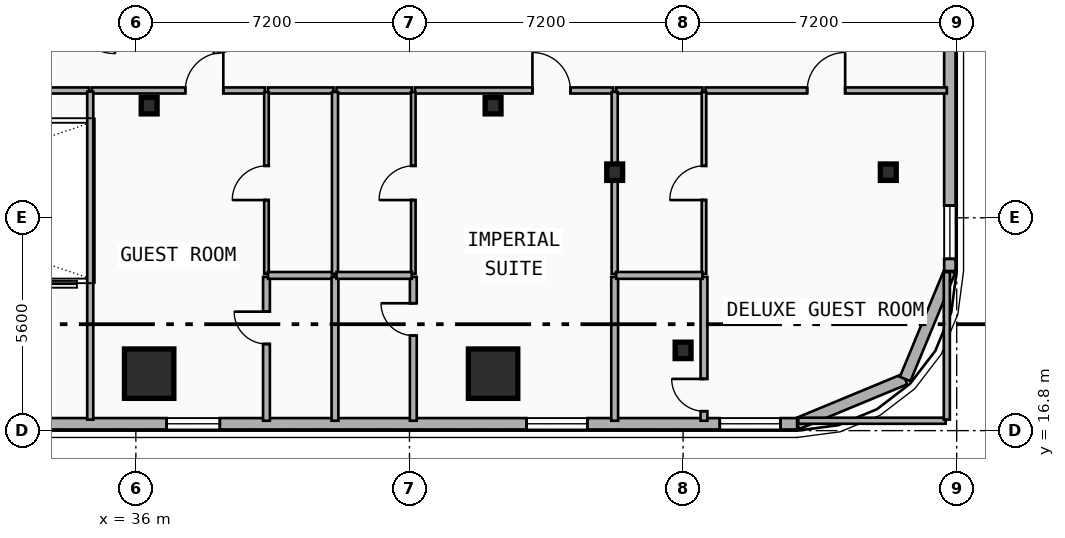
"""IFC4 building model, lengths in metres.
Left out: names, types, materials, properties, quantities, classifications, styles, units other than length and angle.
Written with IfcOpenShell. Run it as: python <this file> out.ifc"""

import sys

from ifc_helpers import new_model, si_unit, direction, frame, frame_2d, origin, origin_2d, place, context, subcontext, project, spatial, rectangle, i_section, extrude, element, fill, save


model = new_model("IFC4")
c1 = context("Model", 3, precision=1e-05, world=origin(), true_north=direction((0.0, 1.0)))
c2 = subcontext(c1, "Body", "Model", "MODEL_VIEW")
j1 = project(units=[si_unit("LENGTHUNIT", "METRE"), si_unit("PLANEANGLEUNIT", "RADIAN")], contexts=[c1])
p1 = place(None, origin())
s1 = spatial("IfcSite", under=j1, at=p1, CompositionType="ELEMENT")
p2 = place(p1, origin())
s2 = spatial("IfcBuilding", under=s1, at=p2, CompositionType="ELEMENT")
p3 = place(p2, frame((0.0, 0.0, 86.3)))
s3 = spatial("IfcBuildingStorey", under=s2, at=p3, CompositionType="ELEMENT", Elevation=86.3)
for number, where, z_axis, x_axis in (
    (1, (36.35, 25.35, 0.0), (0.0, 0.0, 1.0), (1.0, 0.0, 0.0)),
    (2, (45.4, 25.35, 0.0), (0.0, 0.0, 1.0), (1.0, 0.0, 0.0)),
):
    element("IfcColumn", number, at=place(p3, frame(where, z_axis=z_axis, x_axis=x_axis)), inside=s3, PredefinedType="COLUMN", context=c2, shape_type="SweptSolid", body=[
        extrude(i_section(OverallWidth=0.418, OverallDepth=0.432, WebThickness=0.035, FlangeThickness=0.056, FilletRadius=0.015, at=origin_2d()), origin(), (0.0, 0.0, 1.0), 3.5),
    ])
for number, where, z_axis, x_axis in (
    (3, (36.35, 18.407, 0.0), (0.0, -0.09, 0.996), (1.0, 0.0, 0.0)),
    (4, (45.4, 18.407, 0.0), (0.0, -0.09, 0.996), (1.0, 0.0, 0.0)),
):
    element("IfcColumn", number, at=place(p3, frame(where, z_axis=z_axis, x_axis=x_axis)), inside=s3, PredefinedType="COLUMN", context=c2, shape_type="SweptSolid", body=[
        extrude(rectangle(XDim=1.3, YDim=1.3, at=origin_2d()), origin(), (0.0, 0.0, 1.0), 3.514),
    ])
p4 = place(p3, frame((48.6, 23.6, 0.0), z_axis=(0.0, 0.0, 1.0), x_axis=(1.0, 0.0, 0.0)))
e5 = element("IfcColumn", 5, at=p4, inside=s3, PredefinedType="COLUMN", context=c2, shape_type="SweptSolid", body=[
    extrude(i_section(OverallWidth=0.418, OverallDepth=0.432, WebThickness=0.035, FlangeThickness=0.056, FilletRadius=0.015, at=origin_2d()), origin(), (0.0, 0.0, 1.0), 3.5),
])
p5 = place(p3, frame((50.4, 19.008, 0.0), z_axis=(0.0, -0.079960777917, 0.996798010629), x_axis=(1.0, 0.0, 0.0)))
e6 = element("IfcColumn", 6, at=p5, inside=s3, PredefinedType="COLUMN", context=c2, shape_type="SweptSolid", body=[
    extrude(i_section(OverallWidth=0.418, OverallDepth=0.432, WebThickness=0.035, FlangeThickness=0.056, FilletRadius=0.015, at=origin_2d()), origin(), (0.0, 0.0, 1.0), 3.511),
])
p6 = place(p3, frame((55.8, 23.6, 0.0), z_axis=(0.0, 0.0, 1.0), x_axis=(1.0, 0.0, 0.0)))
e7 = element("IfcColumn", 7, at=p6, inside=s3, PredefinedType="COLUMN", context=c2, shape_type="SweptSolid", body=[
    extrude(i_section(OverallWidth=0.418, OverallDepth=0.432, WebThickness=0.035, FlangeThickness=0.056, FilletRadius=0.015, at=origin_2d()), origin(), (0.0, 0.0, 1.0), 3.5),
])
p7 = place(p3, frame((56.243, 18.157, 0.0), z_axis=(0.0, 0.0, 1.0), x_axis=(-0.923882414032, -0.382676475685, 0.0)))
e8 = element("IfcWall", 8, at=p7, inside=s3, PredefinedType="SOLIDWALL", context=c2, shape_type="SweptSolid", body=[
    extrude(rectangle(XDim=3.077, YDim=0.3, at=frame_2d((1.539, 0.0))), origin(), (0.0, 0.0, 1.0), 3.24),
])
p8 = place(p3, frame((57.42, 21.0, 0.0), z_axis=(0.0, 0.0, 1.0), x_axis=(-0.382636798336, -0.92389884758, 0.0)))
e9 = element("IfcWall", 9, at=p8, inside=s3, PredefinedType="SOLIDWALL", context=c2, shape_type="SweptSolid", body=[
    extrude(rectangle(XDim=3.077, YDim=0.3, at=frame_2d((1.538, 0.0))), origin(), (0.0, 0.0, 1.0), 3.24),
])
p9 = place(p3, frame((57.42, 39.0, 0.0), z_axis=(0.0, 0.0, 1.0), x_axis=(0.0, -1.0, 0.0)))
e10 = element("IfcWall", 10, at=p9, inside=s3, PredefinedType="SOLIDWALL", context=c2, shape_type="SweptSolid", body=[
    extrude(rectangle(XDim=18.0, YDim=0.3, at=frame_2d((9.0, 0.0))), origin(), (0.0, 0.0, 1.0), 3.24),
])
p10 = place(p9, frame((8.882, 0.0, 0.48)))
e11 = element("IfcOpeningElement", 11, at=p10, cuts=e10, PredefinedType="OPENING", context=c2, shape_type="SweptSolid", body=[
    extrude(rectangle(XDim=1.4, YDim=1.8, at=frame_2d((0.7, 0.9))), frame((0.0, 0.16, 0.0), z_axis=(0.0, -1.0, 0.0), x_axis=(1.0, 0.0, 0.0)), (0.0, 0.0, 1.0), 0.32),
])
p11 = place(p9, frame((3.621, 0.0, 0.48)))
e12 = element("IfcOpeningElement", 12, at=p11, cuts=e10, PredefinedType="OPENING", context=c2, shape_type="SweptSolid", body=[
    extrude(rectangle(XDim=1.4, YDim=1.8, at=frame_2d((0.7, 0.9))), frame((0.0, 0.16, 0.0), z_axis=(0.0, -1.0, 0.0), x_axis=(1.0, 0.0, 0.0)), (0.0, 0.0, 1.0), 0.32),
])
p12 = place(p9, frame((16.28, 0.0, 0.65)))
e13 = element("IfcOpeningElement", 13, at=p12, cuts=e10, PredefinedType="OPENING", context=c2, shape_type="SweptSolid", body=[
    extrude(rectangle(XDim=1.4, YDim=1.8, at=frame_2d((0.7, 0.9))), frame((0.0, 0.16, 0.0), z_axis=(0.0, -1.0, 0.0), x_axis=(1.0, 0.0, 0.0)), (0.0, 0.0, 1.0), 0.32),
])
p13 = place(p3, frame((53.4, 16.98, 0.0), z_axis=(0.0, 0.0, 1.0), x_axis=(-1.0, 0.0, 0.0)))
e14 = element("IfcWall", 14, at=p13, inside=s3, PredefinedType="SOLIDWALL", context=c2, shape_type="SweptSolid", body=[
    extrude(rectangle(XDim=49.2, YDim=0.3, at=frame_2d((24.6, 0.0))), origin(), (0.0, 0.0, 1.0), 3.24),
])
p14 = place(p13, frame((47.165, 0.0, 0.48)))
e15 = element("IfcOpeningElement", 15, at=p14, cuts=e14, PredefinedType="OPENING", context=c2, shape_type="SweptSolid", body=[
    extrude(rectangle(XDim=1.6, YDim=1.95, at=frame_2d((0.8, 0.975))), frame((0.0, 0.16, 0.0), z_axis=(0.0, -1.0, 0.0), x_axis=(1.0, 0.0, 0.0)), (0.0, 0.0, 1.0), 0.32),
])
p15 = place(p13, frame((42.08, 0.0, 0.8)))
e16 = element("IfcOpeningElement", 16, at=p15, cuts=e14, PredefinedType="OPENING", context=c2, shape_type="SweptSolid", body=[
    extrude(rectangle(XDim=1.6, YDim=1.95, at=frame_2d((0.8, 0.975))), frame((0.0, 0.16, 0.0), z_axis=(0.0, -1.0, 0.0), x_axis=(1.0, 0.0, 0.0)), (0.0, 0.0, 1.0), 0.32),
])
p16 = place(p13, frame((32.561, 0.0, 1.05)))
e17 = element("IfcOpeningElement", 17, at=p16, cuts=e14, PredefinedType="OPENING", context=c2, shape_type="SweptSolid", body=[
    extrude(rectangle(XDim=1.1, YDim=1.05, at=frame_2d((0.55, 0.525))), frame((0.0, 0.16, 0.0), z_axis=(0.0, -1.0, 0.0), x_axis=(1.0, 0.0, 0.0)), (0.0, 0.0, 1.0), 0.32),
])
p17 = place(p13, frame((15.189, 0.0, 0.34)))
e18 = element("IfcOpeningElement", 18, at=p17, cuts=e14, PredefinedType="OPENING", context=c2, shape_type="SweptSolid", body=[
    extrude(rectangle(XDim=1.4, YDim=1.8, at=frame_2d((0.7, 0.9))), frame((0.0, 0.16, 0.0), z_axis=(0.0, -1.0, 0.0), x_axis=(1.0, 0.0, 0.0)), (0.0, 0.0, 1.0), 0.32),
])
p18 = place(p13, frame((5.52, 0.0, 0.8)))
e19 = element("IfcOpeningElement", 19, at=p18, cuts=e14, PredefinedType="OPENING", context=c2, shape_type="SweptSolid", body=[
    extrude(rectangle(XDim=1.6, YDim=1.95, at=frame_2d((0.8, 0.975))), frame((0.0, 0.16, 0.0), z_axis=(0.0, -1.0, 0.0), x_axis=(1.0, 0.0, 0.0)), (0.0, 0.0, 1.0), 0.32),
])
p19 = place(p13, frame((0.435, 0.0, 0.48)))
e20 = element("IfcOpeningElement", 20, at=p19, cuts=e14, PredefinedType="OPENING", context=c2, shape_type="SweptSolid", body=[
    extrude(rectangle(XDim=1.6, YDim=1.95, at=frame_2d((0.8, 0.975))), frame((0.0, 0.16, 0.0), z_axis=(0.0, -1.0, 0.0), x_axis=(1.0, 0.0, 0.0)), (0.0, 0.0, 1.0), 0.32),
])
p20 = place(p3, frame((34.84, 25.75, 0.0), z_axis=(0.0, 0.0, 1.0), x_axis=(1.0, 0.0, 0.0)))
e21 = element("IfcWall", 21, at=p20, inside=s3, PredefinedType="PARTITIONING", context=c2, shape_type="SweptSolid", body=[
    extrude(rectangle(XDim=4.557, YDim=0.16, at=frame_2d((2.278, 0.0))), origin(), (0.0, 0.0, 1.0), 2.31),
])
p21 = place(p20, frame((2.461, 0.0, 0.0)))
e22 = element("IfcOpeningElement", 22, at=p21, cuts=e21, PredefinedType="OPENING", context=c2, shape_type="SweptSolid", body=[
    extrude(rectangle(XDim=1.0, YDim=2.15, at=frame_2d((0.5, 1.075))), frame((0.0, 0.09, 0.0), z_axis=(0.0, -1.0, 0.0), x_axis=(1.0, 0.0, 0.0)), (0.0, 0.0, 1.0), 0.18),
])
p22 = place(p3, frame((39.477, 25.75, 0.0), z_axis=(0.0, 0.0, 1.0), x_axis=(1.0, 0.0, 0.0)))
e23 = element("IfcWall", 23, at=p22, inside=s3, PredefinedType="PARTITIONING", context=c2, shape_type="SweptSolid", body=[
    extrude(rectangle(XDim=1.723, YDim=0.16, at=frame_2d((0.861, 0.0))), origin(), (0.0, 0.0, 1.0), 3.24),
])
p23 = place(p3, frame((43.341, 25.75, 0.0), z_axis=(0.0, 0.0, 1.0), x_axis=(1.0, 0.0, 0.0)))
e24 = element("IfcWall", 24, at=p23, inside=s3, PredefinedType="PARTITIONING", context=c2, shape_type="SweptSolid", body=[
    extrude(rectangle(XDim=5.219, YDim=0.16, at=frame_2d((2.609, 0.0))), origin(), (0.0, 0.0, 1.0), 2.31),
])
p24 = place(p23, frame((3.094, 0.0, 0.0)))
e25 = element("IfcOpeningElement", 25, at=p24, cuts=e24, PredefinedType="OPENING", context=c2, shape_type="SweptSolid", body=[
    extrude(rectangle(XDim=1.0, YDim=2.15, at=frame_2d((0.5, 1.075))), frame((0.0, 0.09, 0.0), z_axis=(0.0, -1.0, 0.0), x_axis=(1.0, 0.0, 0.0)), (0.0, 0.0, 1.0), 0.18),
])
p25 = place(p3, frame((41.28, 25.75, 0.0), z_axis=(0.0, 0.0, 1.0), x_axis=(1.0, 0.0, 0.0)))
e26 = element("IfcWall", 26, at=p25, inside=s3, PredefinedType="PARTITIONING", context=c2, shape_type="SweptSolid", body=[
    extrude(rectangle(XDim=1.981, YDim=0.16, at=frame_2d((0.99, 0.0))), origin(), (0.0, 0.0, 1.0), 3.24),
])
p26 = place(p3, frame((50.99, 25.75, 0.0), z_axis=(0.0, 0.0, 1.0), x_axis=(1.0, 0.0, 0.0)))
e27 = element("IfcWall", 27, at=p26, inside=s3, PredefinedType="PARTITIONING", context=c2, shape_type="SweptSolid", body=[
    extrude(rectangle(XDim=6.35, YDim=0.16, at=frame_2d((3.175, 0.0))), origin(), (0.0, 0.0, 1.0), 2.57),
])
p27 = place(p26, frame((2.675, 0.0, 0.0)))
e28 = element("IfcOpeningElement", 28, at=p27, cuts=e27, PredefinedType="OPENING", context=c2, shape_type="SweptSolid", body=[
    extrude(rectangle(XDim=1.0, YDim=2.15, at=frame_2d((0.5, 1.075))), frame((0.0, 0.09, 0.0), z_axis=(0.0, -1.0, 0.0), x_axis=(1.0, 0.0, 0.0)), (0.0, 0.0, 1.0), 0.18),
])
p28 = place(p3, frame((48.64, 25.75, 0.0), z_axis=(0.0, 0.0, 1.0), x_axis=(1.0, 0.0, 0.0)))
e29 = element("IfcWall", 29, at=p28, inside=s3, PredefinedType="PARTITIONING", context=c2, shape_type="SweptSolid", body=[
    extrude(rectangle(XDim=2.27, YDim=0.16, at=frame_2d((1.135, 0.0))), origin(), (0.0, 0.0, 1.0), 2.57),
])
p29 = place(p3, frame((39.437, 17.06, 0.0), z_axis=(0.0, 0.0, 1.0), x_axis=(0.0, 1.0, 0.0)))
e30 = element("IfcWall", 30, at=p29, inside=s3, PredefinedType="PLUMBINGWALL", context=c2, shape_type="SweptSolid", body=[
    extrude(rectangle(XDim=3.784, YDim=0.18, at=frame_2d((1.892, 0.0))), origin(), (0.0, 0.0, 1.0), 2.82),
])
p30 = place(p29, frame((2.02, 0.0, 0.0)))
e31 = element("IfcOpeningElement", 31, at=p30, cuts=e30, PredefinedType="OPENING", context=c2, shape_type="SweptSolid", body=[
    extrude(rectangle(XDim=0.85, YDim=2.1, at=frame_2d((0.425, 1.05))), frame((0.0, 0.1, 0.0), z_axis=(0.0, -1.0, 0.0), x_axis=(1.0, 0.0, 0.0)), (0.0, 0.0, 1.0), 0.2),
])
p31 = place(p3, frame((39.437, 20.924, 0.0), z_axis=(0.0, 0.0, 1.0), x_axis=(0.0, 1.0, 0.0)))
e32 = element("IfcWall", 32, at=p31, inside=s3, PredefinedType="PARTITIONING", context=c2, shape_type="SweptSolid", body=[
    extrude(rectangle(XDim=4.786, YDim=0.12, at=frame_2d((2.393, 0.0))), origin(), (0.0, 0.0, 1.0), 2.72),
])
p32 = place(p31, frame((1.943, 0.0, 0.0)))
e33 = element("IfcOpeningElement", 33, at=p32, cuts=e32, PredefinedType="OPENING", context=c2, shape_type="SweptSolid", body=[
    extrude(rectangle(XDim=0.9, YDim=2.1, at=frame_2d((0.45, 1.05))), frame((0.0, 0.07, 0.0), z_axis=(0.0, -1.0, 0.0), x_axis=(1.0, 0.0, 0.0)), (0.0, 0.0, 1.0), 0.14),
])
p33 = place(p3, frame((39.477, 20.884, 0.0), z_axis=(0.0, 0.0, 1.0), x_axis=(1.0, 0.0, 0.0)))
e34 = element("IfcWall", 34, at=p33, inside=s3, PredefinedType="PLUMBINGWALL", context=c2, shape_type="SweptSolid", body=[
    extrude(rectangle(XDim=1.723, YDim=0.18, at=frame_2d((0.861, 0.0))), origin(), (0.0, 0.0, 1.0), 2.87),
])
p34 = place(p3, frame((41.24, 17.06, 0.0), z_axis=(0.0, 0.0, 1.0), x_axis=(0.0, 1.0, 0.0)))
e35 = element("IfcWall", 35, at=p34, inside=s3, PredefinedType="PLUMBINGWALL", context=c2, shape_type="SweptSolid", body=[
    extrude(rectangle(XDim=3.784, YDim=0.18, at=frame_2d((1.892, 0.0))), origin(), (0.0, 0.0, 1.0), 2.82),
])
p35 = place(p3, frame((41.24, 20.924, 0.0), z_axis=(0.0, 0.0, 1.0), x_axis=(0.0, 1.0, 0.0)))
e36 = element("IfcWall", 36, at=p35, inside=s3, PredefinedType="PARTITIONING", context=c2, shape_type="SweptSolid", body=[
    extrude(rectangle(XDim=4.786, YDim=0.16, at=frame_2d((2.393, 0.0))), origin(), (0.0, 0.0, 1.0), 2.72),
])
p36 = place(p3, frame((43.301, 17.06, 0.0), z_axis=(0.0, 0.0, 1.0), x_axis=(0.0, 1.0, 0.0)))
e37 = element("IfcWall", 37, at=p36, inside=s3, PredefinedType="PLUMBINGWALL", context=c2, shape_type="SweptSolid", body=[
    extrude(rectangle(XDim=3.784, YDim=0.18, at=frame_2d((1.892, 0.0))), origin(), (0.0, 0.0, 1.0), 2.82),
])
p37 = place(p36, frame((2.241, 0.0, 0.0)))
e38 = element("IfcOpeningElement", 38, at=p37, cuts=e37, PredefinedType="OPENING", context=c2, shape_type="SweptSolid", body=[
    extrude(rectangle(XDim=0.85, YDim=2.1, at=frame_2d((0.425, 1.05))), frame((0.0, 0.1, 0.0), z_axis=(0.0, -1.0, 0.0), x_axis=(1.0, 0.0, 0.0)), (0.0, 0.0, 1.0), 0.2),
])
p38 = place(p3, frame((43.301, 20.924, 0.0), z_axis=(0.0, 0.0, 1.0), x_axis=(0.0, 1.0, 0.0)))
e39 = element("IfcWall", 39, at=p38, inside=s3, PredefinedType="PARTITIONING", context=c2, shape_type="SweptSolid", body=[
    extrude(rectangle(XDim=4.786, YDim=0.12, at=frame_2d((2.393, 0.0))), origin(), (0.0, 0.0, 1.0), 2.72),
])
p39 = place(p38, frame((1.943, 0.0, 0.0)))
e40 = element("IfcOpeningElement", 40, at=p39, cuts=e39, PredefinedType="OPENING", context=c2, shape_type="SweptSolid", body=[
    extrude(rectangle(XDim=0.9, YDim=2.1, at=frame_2d((0.45, 1.05))), frame((0.0, 0.07, 0.0), z_axis=(0.0, -1.0, 0.0), x_axis=(1.0, 0.0, 0.0)), (0.0, 0.0, 1.0), 0.14),
])
p40 = place(p3, frame((48.6, 17.06, 0.0), z_axis=(0.0, 0.0, 1.0), x_axis=(0.0, 1.0, 0.0)))
e41 = element("IfcWall", 41, at=p40, inside=s3, PredefinedType="PLUMBINGWALL", context=c2, shape_type="SweptSolid", body=[
    extrude(rectangle(XDim=3.784, YDim=0.18, at=frame_2d((1.892, 0.0))), origin(), (0.0, 0.0, 1.0), 2.72),
])
p41 = place(p3, frame((48.6, 20.924, 0.0), z_axis=(0.0, 0.0, 1.0), x_axis=(0.0, 1.0, 0.0)))
e42 = element("IfcWall", 42, at=p41, inside=s3, PredefinedType="PARTITIONING", context=c2, shape_type="SweptSolid", body=[
    extrude(rectangle(XDim=4.786, YDim=0.16, at=frame_2d((2.393, 0.0))), origin(), (0.0, 0.0, 1.0), 2.72),
])
p42 = place(p3, frame((41.28, 20.884, 0.0), z_axis=(0.0, 0.0, 1.0), x_axis=(1.0, 0.0, 0.0)))
e43 = element("IfcWall", 43, at=p42, inside=s3, PredefinedType="PLUMBINGWALL", context=c2, shape_type="SweptSolid", body=[
    extrude(rectangle(XDim=1.981, YDim=0.18, at=frame_2d((0.99, 0.0))), origin(), (0.0, 0.0, 1.0), 2.87),
])
p43 = place(p3, frame((50.95, 17.06, 0.0), z_axis=(0.0, 0.0, 1.0), x_axis=(0.0, 1.0, 0.0)))
e44 = element("IfcWall", 44, at=p43, inside=s3, PredefinedType="PLUMBINGWALL", context=c2, shape_type="SweptSolid", body=[
    extrude(rectangle(XDim=3.784, YDim=0.18, at=frame_2d((1.892, 0.0))), origin(), (0.0, 0.0, 1.0), 2.57),
])
p44 = place(p43, frame((0.25, 0.0, 0.0)))
e45 = element("IfcOpeningElement", 45, at=p44, cuts=e44, PredefinedType="OPENING", context=c2, shape_type="SweptSolid", body=[
    extrude(rectangle(XDim=0.85, YDim=2.1, at=frame_2d((0.425, 1.05))), frame((0.0, 0.1, 0.0), z_axis=(0.0, -1.0, 0.0), x_axis=(1.0, 0.0, 0.0)), (0.0, 0.0, 1.0), 0.2),
])
p45 = place(p3, frame((50.95, 20.924, 0.0), z_axis=(0.0, 0.0, 1.0), x_axis=(0.0, 1.0, 0.0)))
e46 = element("IfcWall", 46, at=p45, inside=s3, PredefinedType="PARTITIONING", context=c2, shape_type="SweptSolid", body=[
    extrude(rectangle(XDim=4.786, YDim=0.12, at=frame_2d((2.393, 0.0))), origin(), (0.0, 0.0, 1.0), 2.57),
])
p46 = place(p45, frame((1.943, 0.0, 0.0)))
e47 = element("IfcOpeningElement", 47, at=p46, cuts=e46, PredefinedType="OPENING", context=c2, shape_type="SweptSolid", body=[
    extrude(rectangle(XDim=0.9, YDim=2.1, at=frame_2d((0.45, 1.05))), frame((0.0, 0.07, 0.0), z_axis=(0.0, -1.0, 0.0), x_axis=(1.0, 0.0, 0.0)), (0.0, 0.0, 1.0), 0.14),
])
p47 = place(p3, frame((48.64, 20.884, 0.0), z_axis=(0.0, 0.0, 1.0), x_axis=(1.0, 0.0, 0.0)))
e48 = element("IfcWall", 48, at=p47, inside=s3, PredefinedType="PLUMBINGWALL", context=c2, shape_type="SweptSolid", body=[
    extrude(rectangle(XDim=2.27, YDim=0.18, at=frame_2d((1.135, 0.0))), origin(), (0.0, 0.0, 1.0), 2.57),
])
p48 = place(p3, frame((22.83, 25.75, 0.0), z_axis=(0.0, 0.0, 1.0), x_axis=(1.0, 0.0, 0.0)))
e49 = element("IfcWall", 49, at=p48, inside=s3, PredefinedType="PARTITIONING", context=c2, shape_type="SweptSolid", body=[
    extrude(rectangle(XDim=11.94, YDim=0.16, at=frame_2d((5.97, 0.0))), origin(), (0.0, 0.0, 1.0), 3.24),
])
p49 = place(p3, frame((34.8, 17.09, 0.0), z_axis=(0.0, 0.0, 1.0), x_axis=(0.0, 1.0, 0.0)))
e50 = element("IfcWall", 50, at=p49, inside=s3, PredefinedType="PARTITIONING", context=c2, shape_type="SweptSolid", body=[
    extrude(rectangle(XDim=8.63, YDim=0.16, at=frame_2d((4.315, 0.0))), origin(), (0.0, 0.0, 1.0), 2.68),
])
p50 = place(p3, frame((53.43, 17.06, 0.0), z_axis=(0.0, 0.0, 1.0), x_axis=(1.0, 0.0, 0.0)))
e51 = element("IfcWall", 51, at=p50, inside=s3, PredefinedType="PARTITIONING", context=c2, shape_type="SweptSolid", body=[
    extrude(rectangle(XDim=3.88, YDim=0.16, at=frame_2d((1.94, 0.0))), origin(), (0.0, 0.0, 1.0), 3.24),
])
p51 = place(p3, frame((57.34, 17.09, 0.0), z_axis=(0.0, 0.0, 1.0), x_axis=(0.0, 1.0, 0.0)))
e52 = element("IfcWall", 52, at=p51, inside=s3, PredefinedType="PARTITIONING", context=c2, shape_type="SweptSolid", body=[
    extrude(rectangle(XDim=3.88, YDim=0.16, at=frame_2d((1.94, 0.0))), origin(), (0.0, 0.0, 1.0), 3.24),
])
p52 = place(p12, origin())
e53 = element("IfcWindow", 53, at=p52, inside=s3, PartitioningType="SINGLE_PANEL", PredefinedType="WINDOW", context=c2, shape_type="SweptSolid", body=[
    extrude(rectangle(XDim=1.4, YDim=1.8, at=frame_2d((0.7, 0.9))), frame((0.0, 0.03, 0.0), z_axis=(0.0, -1.0, 0.0), x_axis=(1.0, 0.0, 0.0)), (0.0, 0.0, 1.0), 0.06),
])
fill(e13, e53)
p53 = place(p17, origin())
e54 = element("IfcWindow", 54, at=p53, inside=s3, PartitioningType="SINGLE_PANEL", PredefinedType="WINDOW", context=c2, shape_type="SweptSolid", body=[
    extrude(rectangle(XDim=1.4, YDim=1.8, at=frame_2d((0.7, 0.9))), frame((0.0, 0.03, 0.0), z_axis=(0.0, -1.0, 0.0), x_axis=(1.0, 0.0, 0.0)), (0.0, 0.0, 1.0), 0.06),
])
fill(e18, e54)
p54 = place(p18, origin())
e55 = element("IfcWindow", 55, at=p54, inside=s3, PartitioningType="SINGLE_PANEL", PredefinedType="WINDOW", context=c2, shape_type="SweptSolid", body=[
    extrude(rectangle(XDim=1.6, YDim=1.95, at=frame_2d((0.8, 0.975))), frame((0.0, 0.03, 0.0), z_axis=(0.0, -1.0, 0.0), x_axis=(1.0, 0.0, 0.0)), (0.0, 0.0, 1.0), 0.06),
])
fill(e19, e55)
p55 = place(p19, origin())
e56 = element("IfcWindow", 56, at=p55, inside=s3, PartitioningType="SINGLE_PANEL", PredefinedType="WINDOW", context=c2, shape_type="SweptSolid", body=[
    extrude(rectangle(XDim=1.6, YDim=1.95, at=frame_2d((0.8, 0.975))), frame((0.0, 0.03, 0.0), z_axis=(0.0, -1.0, 0.0), x_axis=(1.0, 0.0, 0.0)), (0.0, 0.0, 1.0), 0.06),
])
fill(e20, e56)
p56 = place(p21, origin())
e57 = element("IfcDoor", 57, at=p56, inside=s3, OperationType="SINGLE_SWING_RIGHT", PredefinedType="DOOR", context=c2, shape_type="SweptSolid", body=[
    extrude(rectangle(XDim=1.0, YDim=2.15, at=frame_2d((0.5, 1.075))), frame((0.0, 0.025, 0.0), z_axis=(0.0, -1.0, 0.0), x_axis=(1.0, 0.0, 0.0)), (0.0, 0.0, 1.0), 0.05),
])
fill(e22, e57)
p57 = place(p24, origin())
e58 = element("IfcDoor", 58, at=p57, inside=s3, OperationType="SINGLE_SWING_LEFT", PredefinedType="DOOR", context=c2, shape_type="SweptSolid", body=[
    extrude(rectangle(XDim=1.0, YDim=2.15, at=frame_2d((0.5, 1.075))), frame((0.0, 0.025, 0.0), z_axis=(0.0, -1.0, 0.0), x_axis=(1.0, 0.0, 0.0)), (0.0, 0.0, 1.0), 0.05),
])
fill(e25, e58)
p58 = place(p27, origin())
e59 = element("IfcDoor", 59, at=p58, inside=s3, OperationType="SINGLE_SWING_RIGHT", PredefinedType="DOOR", context=c2, shape_type="SweptSolid", body=[
    extrude(rectangle(XDim=1.0, YDim=2.15, at=frame_2d((0.5, 1.075))), frame((0.0, 0.025, 0.0), z_axis=(0.0, -1.0, 0.0), x_axis=(1.0, 0.0, 0.0)), (0.0, 0.0, 1.0), 0.05),
])
fill(e28, e59)
p59 = place(p30, origin())
e60 = element("IfcDoor", 60, at=p59, inside=s3, OperationType="SINGLE_SWING_RIGHT", PredefinedType="DOOR", context=c2, shape_type="SweptSolid", body=[
    extrude(rectangle(XDim=0.85, YDim=2.1, at=frame_2d((0.425, 1.05))), frame((0.0, 0.025, 0.0), z_axis=(0.0, -1.0, 0.0), x_axis=(1.0, 0.0, 0.0)), (0.0, 0.0, 1.0), 0.05),
])
fill(e31, e60)
p60 = place(p32, origin())
e61 = element("IfcDoor", 61, at=p60, inside=s3, OperationType="SINGLE_SWING_LEFT", PredefinedType="DOOR", context=c2, shape_type="SweptSolid", body=[
    extrude(rectangle(XDim=0.9, YDim=2.1, at=frame_2d((0.45, 1.05))), frame((0.0, 0.025, 0.0), z_axis=(0.0, -1.0, 0.0), x_axis=(1.0, 0.0, 0.0)), (0.0, 0.0, 1.0), 0.05),
])
fill(e33, e61)
p61 = place(p37, origin())
e62 = element("IfcDoor", 62, at=p61, inside=s3, OperationType="SINGLE_SWING_RIGHT", PredefinedType="DOOR", context=c2, shape_type="SweptSolid", body=[
    extrude(rectangle(XDim=0.85, YDim=2.1, at=frame_2d((0.425, 1.05))), frame((0.0, 0.025, 0.0), z_axis=(0.0, -1.0, 0.0), x_axis=(1.0, 0.0, 0.0)), (0.0, 0.0, 1.0), 0.05),
])
fill(e38, e62)
p62 = place(p39, origin())
e63 = element("IfcDoor", 63, at=p62, inside=s3, OperationType="SINGLE_SWING_LEFT", PredefinedType="DOOR", context=c2, shape_type="SweptSolid", body=[
    extrude(rectangle(XDim=0.9, YDim=2.1, at=frame_2d((0.45, 1.05))), frame((0.0, 0.025, 0.0), z_axis=(0.0, -1.0, 0.0), x_axis=(1.0, 0.0, 0.0)), (0.0, 0.0, 1.0), 0.05),
])
fill(e40, e63)
p63 = place(p44, origin())
e64 = element("IfcDoor", 64, at=p63, inside=s3, OperationType="SINGLE_SWING_RIGHT", PredefinedType="DOOR", context=c2, shape_type="SweptSolid", body=[
    extrude(rectangle(XDim=0.85, YDim=2.1, at=frame_2d((0.425, 1.05))), frame((0.0, 0.025, 0.0), z_axis=(0.0, -1.0, 0.0), x_axis=(1.0, 0.0, 0.0)), (0.0, 0.0, 1.0), 0.05),
])
fill(e45, e64)
p64 = place(p46, origin())
e65 = element("IfcDoor", 65, at=p64, inside=s3, OperationType="SINGLE_SWING_LEFT", PredefinedType="DOOR", context=c2, shape_type="SweptSolid", body=[
    extrude(rectangle(XDim=0.9, YDim=2.1, at=frame_2d((0.45, 1.05))), frame((0.0, 0.025, 0.0), z_axis=(0.0, -1.0, 0.0), x_axis=(1.0, 0.0, 0.0)), (0.0, 0.0, 1.0), 0.05),
])
fill(e47, e65)
save(model, sys.argv[1])
